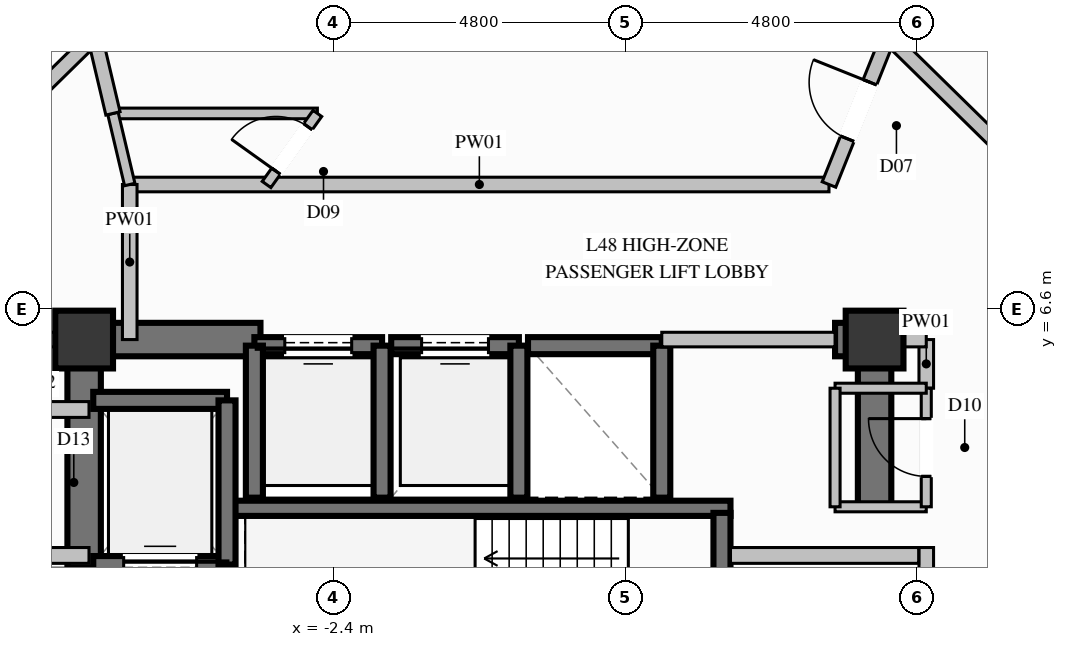
"""IFC4 building model, lengths in metres.
Left out: names, types, materials, properties, quantities, classifications, styles, units other than length and angle.
Written with IfcOpenShell. Run it as: python <this file> out.ifc"""

import sys

from ifc_helpers import new_model, si_unit, direction, frame, frame_2d, origin, origin_2d, place, context, subcontext, project, spatial, rectangle, extrude, element, fill, save


model = new_model("IFC4")
c1 = context("Model", 3, precision=1e-05, world=origin(), true_north=direction((0.0, 1.0)))
c2 = subcontext(c1, "Body", "Model", "MODEL_VIEW")
j1 = project(units=[si_unit("LENGTHUNIT", "METRE"), si_unit("PLANEANGLEUNIT", "RADIAN")], contexts=[c1])
p1 = place(None, origin())
s1 = spatial("IfcSite", under=j1, at=p1, CompositionType="ELEMENT")
p2 = place(p1, origin())
s2 = spatial("IfcBuilding", under=s1, at=p2, CompositionType="ELEMENT")
p3 = place(p2, frame((0.0, 0.0, 187.6)))
s3 = spatial("IfcBuildingStorey", under=s2, at=p3, CompositionType="ELEMENT", Elevation=187.6)
for number, where, z_axis, x_axis in (
    (1, (6.5, 6.1, 0.0), (0.0, 0.0, 1.0), (1.0, 0.0, 0.0)),
    (2, (-6.5, 6.1, 0.0), (0.0, 0.0, 1.0), (1.0, 0.0, 0.0)),
):
    element("IfcColumn", number, at=place(p3, frame(where, z_axis=z_axis, x_axis=x_axis)), inside=s3, PredefinedType="COLUMN", context=c2, shape_type="SweptSolid", body=[
        extrude(rectangle(XDim=0.95, YDim=0.95, at=origin_2d()), origin(), (0.0, 0.0, 1.0), 3.6),
    ])
p4 = place(p3, frame((-4.13, 3.325, 0.0), z_axis=(0.0, 0.0, 1.0), x_axis=(1.0, 0.0, 0.0)))
e3 = element("IfcWall", 3, at=p4, inside=s3, PredefinedType="SOLIDWALL", context=c2, shape_type="SweptSolid", body=[
    extrude(rectangle(XDim=8.26, YDim=0.25, at=frame_2d((4.13, 0.0))), origin(), (0.0, 0.0, 1.0), 3.6),
])
p5 = place(p3, frame((-6.225, 6.1, 0.0), z_axis=(0.0, 0.0, 1.0), x_axis=(1.0, 0.0, 0.0)))
e4 = element("IfcWall", 4, at=p5, inside=s3, PredefinedType="SHEAR", context=c2, shape_type="SweptSolid", body=[
    extrude(rectangle(XDim=2.625, YDim=0.55, at=frame_2d((1.312, 0.0))), origin(), (0.0, 0.0, 1.0), 3.6),
])
p6 = place(p3, frame((5.85, 6.1, 0.0), z_axis=(0.0, 0.0, 1.0), x_axis=(1.0, 0.0, 0.0)))
e5 = element("IfcWall", 5, at=p6, inside=s3, PredefinedType="SHEAR", context=c2, shape_type="SweptSolid", body=[
    extrude(rectangle(XDim=0.375, YDim=0.55, at=frame_2d((0.188, 0.0))), origin(), (0.0, 0.0, 1.0), 3.6),
])
p7 = place(p3, frame((-6.5, 2.35, 0.0), z_axis=(0.0, 0.0, 1.0), x_axis=(0.0, 1.0, 0.0)))
e6 = element("IfcWall", 6, at=p7, inside=s3, PredefinedType="SHEAR", context=c2, shape_type="SweptSolid", body=[
    extrude(rectangle(XDim=4.025, YDim=0.55, at=frame_2d((2.012, 0.0))), origin(), (0.0, 0.0, 1.0), 3.6),
])
p8 = place(p3, frame((6.5, 3.35, 0.0), z_axis=(0.0, 0.0, 1.0), x_axis=(0.0, 1.0, 0.0)))
e7 = element("IfcWall", 7, at=p8, inside=s3, PredefinedType="SHEAR", context=c2, shape_type="SweptSolid", body=[
    extrude(rectangle(XDim=3.025, YDim=0.55, at=frame_2d((1.512, 0.0))), origin(), (0.0, 0.0, 1.0), 3.6),
])
p9 = place(p3, frame((-1.6, 6.0, 0.0), z_axis=(0.0, 0.0, 1.0), x_axis=(-1.0, 0.0, 0.0)))
e8 = element("IfcWall", 8, at=p9, inside=s3, PredefinedType="SOLIDWALL", context=c2, shape_type="SweptSolid", body=[
    extrude(rectangle(XDim=2.1, YDim=0.28, at=frame_2d((1.05, 0.0))), origin(), (0.0, 0.0, 1.0), 3.36),
])
p10 = place(p9, frame((0.5, 0.0, 0.0)))
e9 = element("IfcOpeningElement", 9, at=p10, cuts=e8, PredefinedType="OPENING", context=c2, shape_type="SweptSolid", body=[
    extrude(rectangle(XDim=1.1, YDim=2.2, at=frame_2d((0.55, 1.1))), frame((0.0, 0.15, 0.0), z_axis=(0.0, -1.0, 0.0), x_axis=(1.0, 0.0, 0.0)), (0.0, 0.0, 1.0), 0.3),
])
for number, where, z_axis, x_axis in (
    (10, (-3.7, 6.0, 0.0), (0.0, 0.0, 1.0), (0.0, -1.0, 0.0)),
    (11, (-1.6, 3.5, 0.0), (0.0, 0.0, 1.0), (0.0, 1.0, 0.0)),
):
    element("IfcWall", number, at=place(p3, frame(where, z_axis=z_axis, x_axis=x_axis)), inside=s3, PredefinedType="SOLIDWALL", context=c2, shape_type="SweptSolid", body=[
        extrude(rectangle(XDim=2.5, YDim=0.28, at=frame_2d((1.25, 0.0))), origin(), (0.0, 0.0, 1.0), 3.36),
    ])
p11 = place(p3, frame((0.65, 6.0, 0.0), z_axis=(0.0, 0.0, 1.0), x_axis=(-1.0, 0.0, 0.0)))
e12 = element("IfcWall", 12, at=p11, inside=s3, PredefinedType="SOLIDWALL", context=c2, shape_type="SweptSolid", body=[
    extrude(rectangle(XDim=2.1, YDim=0.28, at=frame_2d((1.05, 0.0))), origin(), (0.0, 0.0, 1.0), 3.36),
])
p12 = place(p11, frame((0.5, 0.0, 0.0)))
e13 = element("IfcOpeningElement", 13, at=p12, cuts=e12, PredefinedType="OPENING", context=c2, shape_type="SweptSolid", body=[
    extrude(rectangle(XDim=1.1, YDim=2.2, at=frame_2d((0.55, 1.1))), frame((0.0, 0.15, 0.0), z_axis=(0.0, -1.0, 0.0), x_axis=(1.0, 0.0, 0.0)), (0.0, 0.0, 1.0), 0.3),
])
p13 = place(p3, frame((0.65, 3.5, 0.0), z_axis=(0.0, 0.0, 1.0), x_axis=(0.0, 1.0, 0.0)))
e14 = element("IfcWall", 14, at=p13, inside=s3, PredefinedType="SOLIDWALL", context=c2, shape_type="SweptSolid", body=[
    extrude(rectangle(XDim=2.5, YDim=0.28, at=frame_2d((1.25, 0.0))), origin(), (0.0, 0.0, 1.0), 3.36),
])
p14 = place(p3, frame((3.0, 6.0, 0.0), z_axis=(0.0, 0.0, 1.0), x_axis=(-1.0, 0.0, 0.0)))
e15 = element("IfcWall", 15, at=p14, inside=s3, PredefinedType="SOLIDWALL", context=c2, shape_type="SweptSolid", body=[
    extrude(rectangle(XDim=2.2, YDim=0.28, at=frame_2d((1.1, 0.0))), origin(), (0.0, 0.0, 1.0), 3.36),
])
p15 = place(p3, frame((3.0, 3.5, 0.0), z_axis=(0.0, 0.0, 1.0), x_axis=(0.0, 1.0, 0.0)))
e16 = element("IfcWall", 16, at=p15, inside=s3, PredefinedType="SOLIDWALL", context=c2, shape_type="SweptSolid", body=[
    extrude(rectangle(XDim=2.5, YDim=0.28, at=frame_2d((1.25, 0.0))), origin(), (0.0, 0.0, 1.0), 3.36),
])
p16 = place(p3, frame((-6.35, 2.4, 0.0), z_axis=(0.0, 0.0, 1.0), x_axis=(1.0, 0.0, 0.0)))
e17 = element("IfcWall", 17, at=p16, inside=s3, PredefinedType="SOLIDWALL", context=c2, shape_type="SweptSolid", body=[
    extrude(rectangle(XDim=2.2, YDim=0.28, at=frame_2d((1.1, 0.0))), origin(), (0.0, 0.0, 1.0), 3.36),
])
p17 = place(p16, frame((0.5, 0.0, 0.0)))
e18 = element("IfcOpeningElement", 18, at=p17, cuts=e17, PredefinedType="OPENING", context=c2, shape_type="SweptSolid", body=[
    extrude(rectangle(XDim=1.2, YDim=2.2, at=frame_2d((0.6, 1.1))), frame((0.0, 0.15, 0.0), z_axis=(0.0, -1.0, 0.0), x_axis=(1.0, 0.0, 0.0)), (0.0, 0.0, 1.0), 0.3),
])
p18 = place(p3, frame((-4.15, 5.1, 0.0), z_axis=(0.0, 0.0, 1.0), x_axis=(-1.0, 0.0, 0.0)))
e19 = element("IfcWall", 19, at=p18, inside=s3, PredefinedType="SOLIDWALL", context=c2, shape_type="SweptSolid", body=[
    extrude(rectangle(XDim=2.2, YDim=0.28, at=frame_2d((1.1, 0.0))), origin(), (0.0, 0.0, 1.0), 3.36),
])
p19 = place(p3, frame((-4.15, 2.4, 0.0), z_axis=(0.0, 0.0, 1.0), x_axis=(0.0, 1.0, 0.0)))
e20 = element("IfcWall", 20, at=p19, inside=s3, PredefinedType="SOLIDWALL", context=c2, shape_type="SweptSolid", body=[
    extrude(rectangle(XDim=2.7, YDim=0.28, at=frame_2d((1.35, 0.0))), origin(), (0.0, 0.0, 1.0), 3.36),
])
p20 = place(p3, frame((3.99, -2.21, 0.0), z_axis=(0.0, 0.0, 1.0), x_axis=(0.0, 1.0, 0.0)))
e21 = element("IfcWall", 21, at=p20, inside=s3, PredefinedType="SOLIDWALL", context=c2, shape_type="SweptSolid", body=[
    extrude(rectangle(XDim=5.46, YDim=0.28, at=frame_2d((2.73, 0.0))), origin(), (0.0, 0.0, 1.0), 3.36),
])
p21 = place(p20, frame((3.323, 0.0, 0.0)))
e22 = element("IfcOpeningElement", 22, at=p21, cuts=e21, PredefinedType="OPENING", context=c2, shape_type="SweptSolid", body=[
    extrude(rectangle(XDim=1.2, YDim=2.2, at=frame_2d((0.6, 1.1))), frame((0.0, 0.15, 0.0), z_axis=(0.0, -1.0, 0.0), x_axis=(1.0, 0.0, 0.0)), (0.0, 0.0, 1.0), 0.3),
])
p22 = place(p3, frame((7.35, -2.34, 0.0), z_axis=(0.0, 0.0, 1.0), x_axis=(0.0, 1.0, 0.0)))
e23 = element("IfcWall", 23, at=p22, inside=s3, PredefinedType="PARTITIONING", context=c2, shape_type="SweptSolid", body=[
    extrude(rectangle(XDim=5.02, YDim=0.24, at=frame_2d((2.51, 0.0))), origin(), (0.0, 0.0, 1.0), 2.445),
])
p23 = place(p22, frame((2.515, 0.0, 0.0)))
e24 = element("IfcOpeningElement", 24, at=p23, cuts=e23, PredefinedType="OPENING", context=c2, shape_type="SweptSolid", body=[
    extrude(rectangle(XDim=1.15, YDim=2.2, at=frame_2d((0.575, 1.1))), frame((0.0, 0.13, 0.0), z_axis=(0.0, -1.0, 0.0), x_axis=(1.0, 0.0, 0.0)), (0.0, 0.0, 1.0), 0.26),
])
p24 = place(p3, frame((4.13, 2.55, 0.0), z_axis=(0.0, 0.0, 1.0), x_axis=(1.0, 0.0, 0.0)))
e25 = element("IfcWall", 25, at=p24, inside=s3, PredefinedType="PARTITIONING", context=c2, shape_type="SweptSolid", body=[
    extrude(rectangle(XDim=3.095, YDim=0.26, at=frame_2d((1.548, 0.0))), origin(), (0.0, 0.0, 1.0), 3.36),
])
for number, where, z_axis, x_axis in (
    (26, (-7.35, 4.95, 0.0), (0.0, 0.0, 1.0), (1.0, 0.0, 0.0)),
    (27, (-7.35, 2.55, 0.0), (0.0, 0.0, 1.0), (1.0, 0.0, 0.0)),
):
    element("IfcWall", number, at=place(p3, frame(where, z_axis=z_axis, x_axis=x_axis)), inside=s3, PredefinedType="PARTITIONING", context=c2, shape_type="SweptSolid", body=[
        extrude(rectangle(XDim=0.93, YDim=0.26, at=frame_2d((0.465, 0.0))), origin(), (0.0, 0.0, 1.0), 3.36),
    ])
p25 = place(p3, frame((-5.75, 8.65, 0.0), z_axis=(0.0, 0.0, 1.0), x_axis=(1.0, 0.0, 0.0)))
e28 = element("IfcWall", 28, at=p25, inside=s3, PredefinedType="PARTITIONING", context=c2, shape_type="SweptSolid", body=[
    extrude(rectangle(XDim=11.5, YDim=0.24, at=frame_2d((5.75, 0.0))), origin(), (0.0, 0.0, 1.0), 3.36),
])
p26 = place(p3, frame((3.0, 6.1, 0.0), z_axis=(0.0, 0.0, 1.0), x_axis=(1.0, 0.0, 0.0)))
e29 = element("IfcWall", 29, at=p26, inside=s3, PredefinedType="PARTITIONING", context=c2, shape_type="SweptSolid", body=[
    extrude(rectangle(XDim=2.85, YDim=0.24, at=frame_2d((1.425, 0.0))), origin(), (0.0, 0.0, 1.0), 2.445),
])
p27 = place(p3, frame((7.35, 5.3, 0.0), z_axis=(0.0, 0.0, 1.0), x_axis=(0.0, 1.0, 0.0)))
e30 = element("IfcWall", 30, at=p27, inside=s3, PredefinedType="PARTITIONING", context=c2, shape_type="SweptSolid", body=[
    extrude(rectangle(XDim=0.8, YDim=0.24, at=frame_2d((0.4, 0.0))), origin(), (0.0, 0.0, 1.0), 2.445),
])
p28 = place(p3, frame((6.5, 6.1, 0.0), z_axis=(0.0, 0.0, 1.0), x_axis=(1.0, 0.0, 0.0)))
e31 = element("IfcWall", 31, at=p28, inside=s3, PredefinedType="PARTITIONING", context=c2, shape_type="SweptSolid", body=[
    extrude(rectangle(XDim=0.85, YDim=0.24, at=frame_2d((0.425, 0.0))), origin(), (0.0, 0.0, 1.0), 2.801),
])
p29 = place(p3, frame((-5.75, 6.1, 0.0), z_axis=(0.0, 0.0, 1.0), x_axis=(0.0, 1.0, 0.0)))
e32 = element("IfcWall", 32, at=p29, inside=s3, PredefinedType="PARTITIONING", context=c2, shape_type="SweptSolid", body=[
    extrude(rectangle(XDim=2.55, YDim=0.24, at=frame_2d((1.275, 0.0))), origin(), (0.0, 0.0, 1.0), 3.36),
])
p30 = place(p3, frame((-7.35, 6.1, 0.0), z_axis=(0.0, 0.0, 1.0), x_axis=(1.0, 0.0, 0.0)))
e33 = element("IfcWall", 33, at=p30, inside=s3, PredefinedType="PARTITIONING", context=c2, shape_type="SweptSolid", body=[
    extrude(rectangle(XDim=0.85, YDim=0.24, at=frame_2d((0.425, 0.0))), origin(), (0.0, 0.0, 1.0), 2.801),
])
p31 = place(p3, frame((5.85, 3.35, 0.0), z_axis=(0.0, 0.0, 1.0), x_axis=(1.0, 0.0, 0.0)))
e34 = element("IfcWall", 34, at=p31, inside=s3, PredefinedType="PARTITIONING", context=c2, shape_type="SweptSolid", body=[
    extrude(rectangle(XDim=1.5, YDim=0.165, at=frame_2d((0.75, 0.0))), origin(), (0.0, 0.0, 1.0), 3.36),
])
p32 = place(p3, frame((7.35, 3.35, 0.0), z_axis=(0.0, 0.0, 1.0), x_axis=(0.0, 1.0, 0.0)))
e35 = element("IfcWall", 35, at=p32, inside=s3, PredefinedType="PARTITIONING", context=c2, shape_type="SweptSolid", body=[
    extrude(rectangle(XDim=1.95, YDim=0.165, at=frame_2d((0.975, 0.0))), origin(), (0.0, 0.0, 1.0), 3.36),
])
p33 = place(p32, frame((0.5, 0.0, 0.0)))
e36 = element("IfcOpeningElement", 36, at=p33, cuts=e35, PredefinedType="OPENING", context=c2, shape_type="SweptSolid", body=[
    extrude(rectangle(XDim=0.95, YDim=2.1, at=frame_2d((0.475, 1.05))), frame((0.0, 0.093, 0.0), z_axis=(0.0, -1.0, 0.0), x_axis=(1.0, 0.0, 0.0)), (0.0, 0.0, 1.0), 0.185),
])
p34 = place(p3, frame((7.35, 5.3, 0.0), z_axis=(0.0, 0.0, 1.0), x_axis=(-1.0, 0.0, 0.0)))
e37 = element("IfcWall", 37, at=p34, inside=s3, PredefinedType="PARTITIONING", context=c2, shape_type="SweptSolid", body=[
    extrude(rectangle(XDim=1.5, YDim=0.165, at=frame_2d((0.75, 0.0))), origin(), (0.0, 0.0, 1.0), 2.445),
])
p35 = place(p3, frame((5.85, 5.3, 0.0), z_axis=(0.0, 0.0, 1.0), x_axis=(0.0, -1.0, 0.0)))
e38 = element("IfcWall", 38, at=p35, inside=s3, PredefinedType="PARTITIONING", context=c2, shape_type="SweptSolid", body=[
    extrude(rectangle(XDim=1.95, YDim=0.165, at=frame_2d((0.975, 0.0))), origin(), (0.0, 0.0, 1.0), 2.445),
])
p36 = place(p3, frame((-6.026, 9.819, 0.0), z_axis=(0.0, 0.0, 1.0), x_axis=(1.0, 0.0, 0.0)))
e39 = element("IfcWall", 39, at=p36, inside=s3, PredefinedType="PLUMBINGWALL", context=c2, shape_type="SweptSolid", body=[
    extrude(rectangle(XDim=3.362, YDim=0.175, at=frame_2d((1.681, 0.0))), origin(), (0.0, 0.0, 1.0), 3.36),
])
p37 = place(p3, frame((-6.026, 9.819, 0.0), z_axis=(0.0, 0.0, 1.0), x_axis=(0.229650980365, -0.973273048644, 0.0)))
e40 = element("IfcWall", 40, at=p37, inside=s3, PredefinedType="PLUMBINGWALL", context=c2, shape_type="SweptSolid", body=[
    extrude(rectangle(XDim=1.201, YDim=0.175, at=frame_2d((0.601, 0.0))), origin(), (0.0, 0.0, 1.0), 3.36),
])
p38 = place(p3, frame((-3.5, 8.65, 0.0), z_axis=(0.0, 0.0, 1.0), x_axis=(0.581607698531, 0.813469412461, 0.0)))
e41 = element("IfcWall", 41, at=p38, inside=s3, PredefinedType="PLUMBINGWALL", context=c2, shape_type="SweptSolid", body=[
    extrude(rectangle(XDim=1.437, YDim=0.175, at=frame_2d((0.719, 0.0))), origin(), (0.0, 0.0, 1.0), 3.36),
])
p39 = place(p38, frame((0.269, 0.0, 0.0)))
e42 = element("IfcOpeningElement", 42, at=p39, cuts=e41, PredefinedType="OPENING", context=c2, shape_type="SweptSolid", body=[
    extrude(rectangle(XDim=0.9, YDim=2.1, at=frame_2d((0.45, 1.05))), frame((0.0, 0.098, 0.0), z_axis=(0.0, -1.0, 0.0), x_axis=(1.0, 0.0, 0.0)), (0.0, 0.0, 1.0), 0.195),
])
p40 = place(p3, frame((-6.026, 9.819, 0.0), z_axis=(0.0, 0.0, 1.0), x_axis=(-0.229928489857, 0.973207526457, 0.0)))
e43 = element("IfcWall", 43, at=p40, inside=s3, PredefinedType="PARTITIONING", context=c2, shape_type="SweptSolid", body=[
    extrude(rectangle(XDim=1.301, YDim=0.24, at=frame_2d((0.65, 0.0))), origin(), (0.0, 0.0, 1.0), 3.36),
])
p41 = place(p3, frame((5.75, 8.65, 0.0), z_axis=(0.0, 0.0, 1.0), x_axis=(0.371743694646, 0.928335405708, 0.0)))
e44 = element("IfcWall", 44, at=p41, inside=s3, PredefinedType="PARTITIONING", context=c2, shape_type="SweptSolid", body=[
    extrude(rectangle(XDim=2.623, YDim=0.24, at=frame_2d((1.312, 0.0))), origin(), (0.0, 0.0, 1.0), 3.36),
])
p42 = place(p41, frame((0.811, 0.0, 0.0)))
e45 = element("IfcOpeningElement", 45, at=p42, cuts=e44, PredefinedType="OPENING", context=c2, shape_type="SweptSolid", body=[
    extrude(rectangle(XDim=1.0, YDim=2.2, at=frame_2d((0.5, 1.1))), frame((0.0, 0.13, 0.0), z_axis=(0.0, -1.0, 0.0), x_axis=(1.0, 0.0, 0.0)), (0.0, 0.0, 1.0), 0.26),
])
p43 = place(p3, frame((-6.325, 11.085, 0.0), z_axis=(0.0, 0.0, 1.0), x_axis=(-0.713850549357, -0.700298074524, 0.0)))
e46 = element("IfcWall", 46, at=p43, inside=s3, PredefinedType="PARTITIONING", context=c2, shape_type="SweptSolid", body=[
    extrude(rectangle(XDim=2.81, YDim=0.24, at=frame_2d((1.405, 0.0))), origin(), (0.0, 0.0, 1.0), 3.36),
])
p44 = place(p3, frame((11.502, 6.4, 0.0), z_axis=(0.0, 0.0, 1.0), x_axis=(-0.713933337596, 0.700213674152, 0.0)))
e47 = element("IfcWall", 47, at=p44, inside=s3, PredefinedType="PARTITIONING", context=c2, shape_type="SweptSolid", body=[
    extrude(rectangle(XDim=6.691, YDim=0.24, at=frame_2d((3.345, 0.0))), origin(), (0.0, 0.0, 1.0), 3.36),
])
p45 = place(p10, origin())
e48 = element("IfcDoor", 48, at=p45, inside=s3, OperationType="SLIDING_TO_LEFT", PredefinedType="DOOR", context=c2, shape_type="SweptSolid", body=[
    extrude(rectangle(XDim=1.1, YDim=2.2, at=frame_2d((0.55, 1.1))), frame((0.0, 0.025, 0.0), z_axis=(0.0, -1.0, 0.0), x_axis=(1.0, 0.0, 0.0)), (0.0, 0.0, 1.0), 0.05),
])
fill(e9, e48)
p46 = place(p12, origin())
e49 = element("IfcDoor", 49, at=p46, inside=s3, OperationType="SLIDING_TO_LEFT", PredefinedType="DOOR", context=c2, shape_type="SweptSolid", body=[
    extrude(rectangle(XDim=1.1, YDim=2.2, at=frame_2d((0.55, 1.1))), frame((0.0, 0.025, 0.0), z_axis=(0.0, -1.0, 0.0), x_axis=(1.0, 0.0, 0.0)), (0.0, 0.0, 1.0), 0.05),
])
fill(e13, e49)
p47 = place(p17, origin())
e50 = element("IfcDoor", 50, at=p47, inside=s3, OperationType="SLIDING_TO_LEFT", PredefinedType="DOOR", context=c2, shape_type="SweptSolid", body=[
    extrude(rectangle(XDim=1.2, YDim=2.2, at=frame_2d((0.6, 1.1))), frame((0.0, 0.025, 0.0), z_axis=(0.0, -1.0, 0.0), x_axis=(1.0, 0.0, 0.0)), (0.0, 0.0, 1.0), 0.05),
])
fill(e18, e50)
p48 = place(p33, origin())
e51 = element("IfcDoor", 51, at=p48, inside=s3, OperationType="SINGLE_SWING_RIGHT", PredefinedType="DOOR", context=c2, shape_type="SweptSolid", body=[
    extrude(rectangle(XDim=0.95, YDim=2.1, at=frame_2d((0.475, 1.05))), frame((0.0, 0.025, 0.0), z_axis=(0.0, -1.0, 0.0), x_axis=(1.0, 0.0, 0.0)), (0.0, 0.0, 1.0), 0.05),
])
fill(e36, e51)
p49 = place(p39, origin())
e52 = element("IfcDoor", 52, at=p49, inside=s3, OperationType="SINGLE_SWING_LEFT", PredefinedType="DOOR", context=c2, shape_type="SweptSolid", body=[
    extrude(rectangle(XDim=0.9, YDim=2.1, at=frame_2d((0.45, 1.05))), frame((0.0, 0.025, 0.0), z_axis=(0.0, -1.0, 0.0), x_axis=(1.0, 0.0, 0.0)), (0.0, 0.0, 1.0), 0.05),
])
fill(e42, e52)
p50 = place(p42, origin())
e53 = element("IfcDoor", 53, at=p50, inside=s3, OperationType="SINGLE_SWING_RIGHT", PredefinedType="DOOR", context=c2, shape_type="SweptSolid", body=[
    extrude(rectangle(XDim=1.0, YDim=2.2, at=frame_2d((0.5, 1.1))), frame((0.0, 0.025, 0.0), z_axis=(0.0, -1.0, 0.0), x_axis=(1.0, 0.0, 0.0)), (0.0, 0.0, 1.0), 0.05),
])
fill(e45, e53)
save(model, sys.argv[1])
